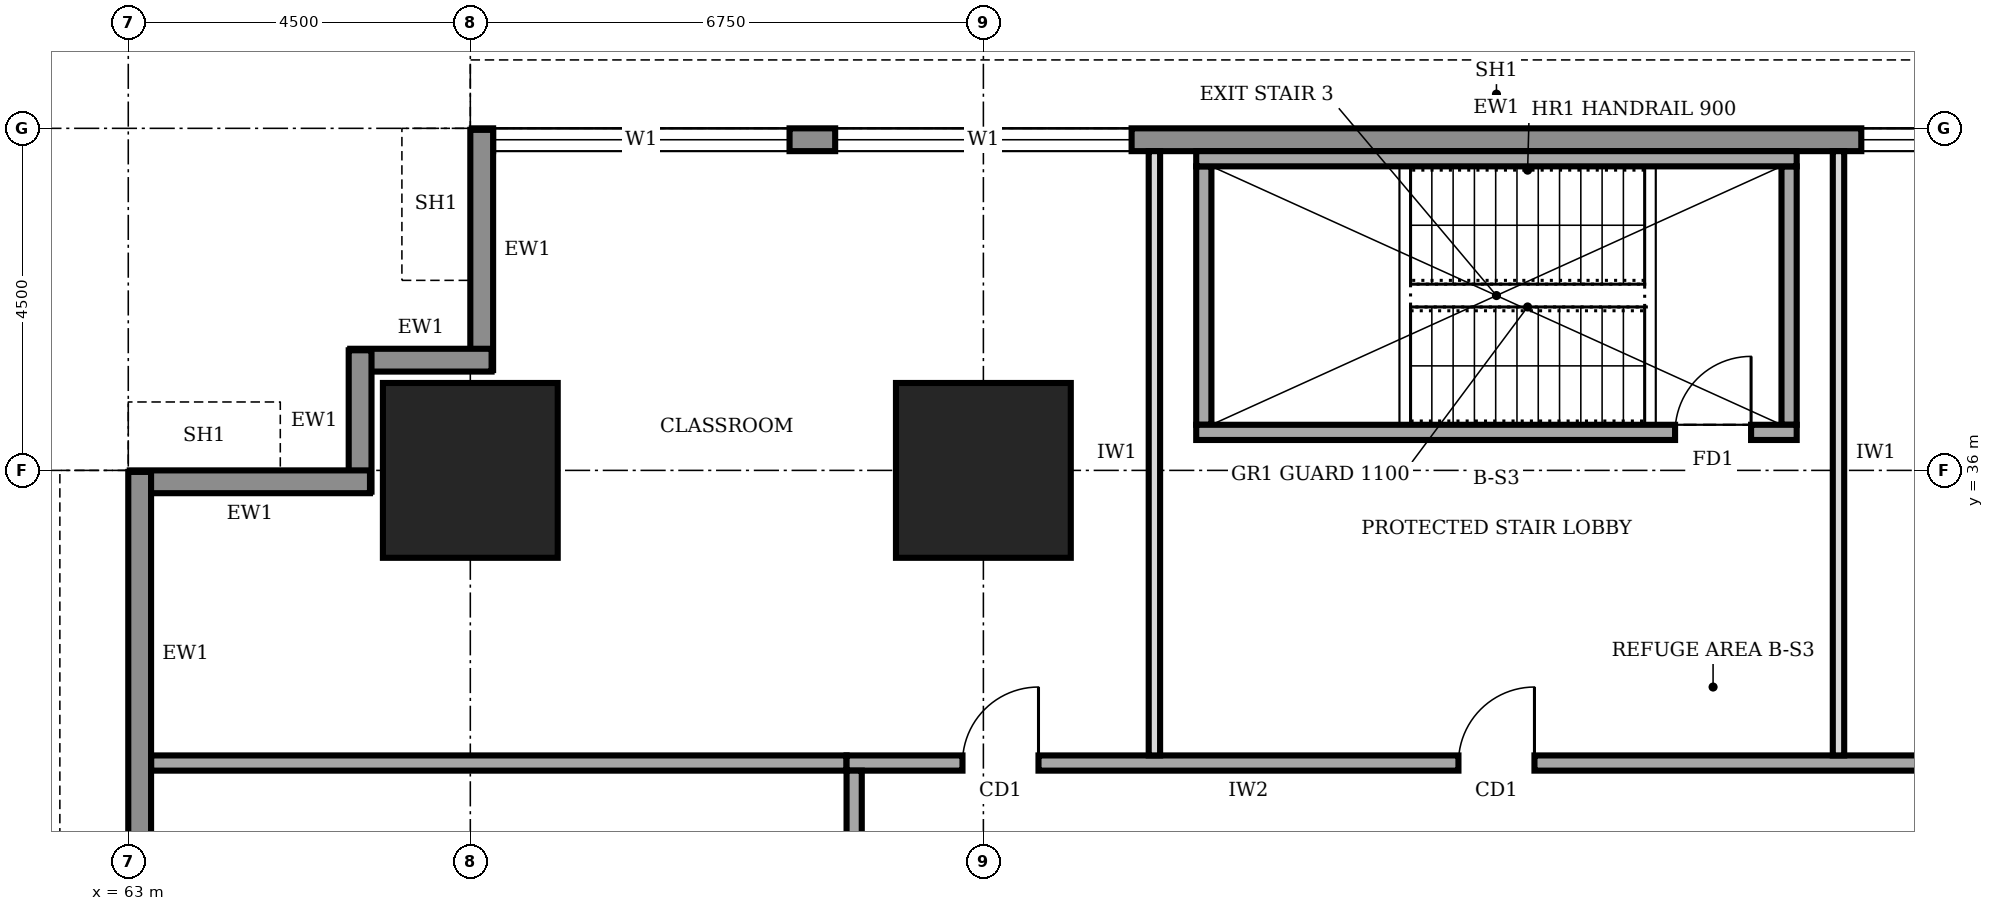
"""IFC4 building model, lengths in metres.
Left out: names, types, materials, properties, quantities, classifications, styles, units other than length and angle.
Written with IfcOpenShell. Run it as: python <this file> out.ifc"""

import sys

from ifc_helpers import new_model, si_unit, direction, frame, frame_2d, origin, origin_2d, place, context, subcontext, project, spatial, rectangle, extrude, element, fill, save


model = new_model("IFC4")
c1 = context("Model", 3, precision=1e-05, world=origin(), true_north=direction((0.0, 1.0)))
c2 = subcontext(c1, "Body", "Model", "MODEL_VIEW")
j1 = project(units=[si_unit("LENGTHUNIT", "METRE"), si_unit("PLANEANGLEUNIT", "RADIAN")], contexts=[c1])
p1 = place(None, origin())
s1 = spatial("IfcSite", under=j1, at=p1, CompositionType="ELEMENT")
p2 = place(p1, origin())
s2 = spatial("IfcBuilding", under=s1, at=p2, CompositionType="ELEMENT")
p3 = place(p2, frame((0.0, 0.0, 41.0)))
s3 = spatial("IfcBuildingStorey", under=s2, at=p3, CompositionType="ELEMENT", Elevation=41.0)
for number, where, z_axis, x_axis in (
    (1, (67.5, 36.0, 0.0), (0.0, 0.0, 1.0), (1.0, 0.0, 0.0)),
    (2, (74.25, 36.0, 0.0), (0.0, 0.0, 1.0), (1.0, 0.0, 0.0)),
):
    element("IfcColumn", number, at=place(p3, frame(where, z_axis=z_axis, x_axis=x_axis)), inside=s3, PredefinedType="COLUMN", context=c2, shape_type="SweptSolid", body=[
        extrude(rectangle(XDim=2.3, YDim=2.3, at=origin_2d()), origin(), (0.0, 0.0, 1.0), 4.0),
    ])
p4 = place(p3, frame((94.48, 40.35, 0.0), z_axis=(0.0, 0.0, 1.0), x_axis=(-1.0, 0.0, 0.0)))
e3 = element("IfcWall", 3, at=p4, inside=s3, PredefinedType="STANDARD", context=c2, shape_type="SweptSolid", body=[
    extrude(rectangle(XDim=26.96, YDim=0.3, at=frame_2d((13.48, 0.0))), origin(), (0.0, 0.0, 1.0), 3.75),
])
p5 = place(p4, frame((22.78, 0.0, 0.9)))
e4 = element("IfcOpeningElement", 4, at=p5, cuts=e3, PredefinedType="OPENING", context=c2, shape_type="SweptSolid", body=[
    extrude(rectangle(XDim=3.9, YDim=2.2, at=frame_2d((1.95, 1.1))), frame((0.0, 0.16, 0.0), z_axis=(0.0, -1.0, 0.0), x_axis=(1.0, 0.0, 0.0)), (0.0, 0.0, 1.0), 0.32),
])
p6 = place(p4, frame((18.28, 0.0, 0.9)))
e5 = element("IfcOpeningElement", 5, at=p6, cuts=e3, PredefinedType="OPENING", context=c2, shape_type="SweptSolid", body=[
    extrude(rectangle(XDim=3.9, YDim=2.2, at=frame_2d((1.95, 1.1))), frame((0.0, 0.16, 0.0), z_axis=(0.0, -1.0, 0.0), x_axis=(1.0, 0.0, 0.0)), (0.0, 0.0, 1.0), 0.32),
])
p7 = place(p4, frame((4.78, 0.0, 0.9)))
e6 = element("IfcOpeningElement", 6, at=p7, cuts=e3, PredefinedType="OPENING", context=c2, shape_type="SweptSolid", body=[
    extrude(rectangle(XDim=3.9, YDim=2.2, at=frame_2d((1.95, 1.1))), frame((0.0, 0.16, 0.0), z_axis=(0.0, -1.0, 0.0), x_axis=(1.0, 0.0, 0.0)), (0.0, 0.0, 1.0), 0.32),
])
p8 = place(p3, frame((67.65, 40.48, 0.0), z_axis=(0.0, 0.0, 1.0), x_axis=(0.0, -1.0, 0.0)))
e7 = element("IfcWall", 7, at=p8, inside=s3, PredefinedType="STANDARD", context=c2, shape_type="SweptSolid", body=[
    extrude(rectangle(XDim=3.16, YDim=0.3, at=frame_2d((1.58, 0.0))), origin(), (0.0, 0.0, 1.0), 2.85),
])
for number, where, z_axis, x_axis in (
    (8, (67.78, 37.45, 0.0), (0.0, 0.0, 1.0), (-1.0, 0.0, 0.0)),
    (9, (66.05, 37.58, 0.0), (0.0, 0.0, 1.0), (0.0, -1.0, 0.0)),
):
    element("IfcWall", number, at=place(p3, frame(where, z_axis=z_axis, x_axis=x_axis)), inside=s3, PredefinedType="STANDARD", context=c2, shape_type="SweptSolid", body=[
        extrude(rectangle(XDim=1.86, YDim=0.3, at=frame_2d((0.93, 0.0))), origin(), (0.0, 0.0, 1.0), 3.75),
    ])
p9 = place(p3, frame((66.18, 35.85, 0.0), z_axis=(0.0, 0.0, 1.0), x_axis=(-1.0, 0.0, 0.0)))
e10 = element("IfcWall", 10, at=p9, inside=s3, PredefinedType="STANDARD", context=c2, shape_type="SweptSolid", body=[
    extrude(rectangle(XDim=3.16, YDim=0.3, at=frame_2d((1.58, 0.0))), origin(), (0.0, 0.0, 1.0), 2.85),
])
p10 = place(p3, frame((63.15, 35.98, 0.0), z_axis=(0.0, 0.0, 1.0), x_axis=(0.0, -1.0, 0.0)))
e11 = element("IfcWall", 11, at=p10, inside=s3, PredefinedType="STANDARD", context=c2, shape_type="SweptSolid", body=[
    extrude(rectangle(XDim=31.46, YDim=0.3, at=frame_2d((15.73, 0.0))), origin(), (0.0, 0.0, 1.0), 3.75),
])
p11 = place(p10, frame((27.28, 0.0, 0.9)))
e12 = element("IfcOpeningElement", 12, at=p11, cuts=e11, PredefinedType="OPENING", context=c2, shape_type="SweptSolid", body=[
    extrude(rectangle(XDim=3.9, YDim=2.2, at=frame_2d((1.95, 1.1))), frame((0.0, 0.16, 0.0), z_axis=(0.0, -1.0, 0.0), x_axis=(1.0, 0.0, 0.0)), (0.0, 0.0, 1.0), 0.32),
])
p12 = place(p10, frame((22.78, 0.0, 0.9)))
e13 = element("IfcOpeningElement", 13, at=p12, cuts=e11, PredefinedType="OPENING", context=c2, shape_type="SweptSolid", body=[
    extrude(rectangle(XDim=3.9, YDim=2.2, at=frame_2d((1.95, 1.1))), frame((0.0, 0.16, 0.0), z_axis=(0.0, -1.0, 0.0), x_axis=(1.0, 0.0, 0.0)), (0.0, 0.0, 1.0), 0.32),
])
p13 = place(p10, frame((18.28, 0.0, 0.9)))
e14 = element("IfcOpeningElement", 14, at=p13, cuts=e11, PredefinedType="OPENING", context=c2, shape_type="SweptSolid", body=[
    extrude(rectangle(XDim=3.9, YDim=2.2, at=frame_2d((1.95, 1.1))), frame((0.0, 0.16, 0.0), z_axis=(0.0, -1.0, 0.0), x_axis=(1.0, 0.0, 0.0)), (0.0, 0.0, 1.0), 0.32),
])
p14 = place(p10, frame((13.78, 0.0, 0.9)))
e15 = element("IfcOpeningElement", 15, at=p14, cuts=e11, PredefinedType="OPENING", context=c2, shape_type="SweptSolid", body=[
    extrude(rectangle(XDim=3.9, YDim=2.2, at=frame_2d((1.95, 1.1))), frame((0.0, 0.16, 0.0), z_axis=(0.0, -1.0, 0.0), x_axis=(1.0, 0.0, 0.0)), (0.0, 0.0, 1.0), 0.32),
])
p15 = place(p10, frame((9.28, 0.0, 0.9)))
e16 = element("IfcOpeningElement", 16, at=p15, cuts=e11, PredefinedType="OPENING", context=c2, shape_type="SweptSolid", body=[
    extrude(rectangle(XDim=3.9, YDim=2.2, at=frame_2d((1.95, 1.1))), frame((0.0, 0.16, 0.0), z_axis=(0.0, -1.0, 0.0), x_axis=(1.0, 0.0, 0.0)), (0.0, 0.0, 1.0), 0.32),
])
p16 = place(p10, frame((4.78, 0.0, 0.9)))
e17 = element("IfcOpeningElement", 17, at=p16, cuts=e11, PredefinedType="OPENING", context=c2, shape_type="SweptSolid", body=[
    extrude(rectangle(XDim=3.9, YDim=2.2, at=frame_2d((1.95, 1.1))), frame((0.0, 0.16, 0.0), z_axis=(0.0, -1.0, 0.0), x_axis=(1.0, 0.0, 0.0)), (0.0, 0.0, 1.0), 0.32),
])
p17 = place(p3, frame((89.35, 32.15, 0.0), z_axis=(0.0, 0.0, 1.0), x_axis=(-1.0, 0.0, 0.0)))
e18 = element("IfcWall", 18, at=p17, inside=s3, PredefinedType="SOLIDWALL", context=c2, shape_type="SweptSolid", body=[
    extrude(rectangle(XDim=16.9, YDim=0.2, at=frame_2d((8.45, 0.0))), origin(), (0.0, 0.0, 1.0), 3.75),
])
p18 = place(p17, frame((14.375, 0.0, 0.0)))
e19 = element("IfcOpeningElement", 19, at=p18, cuts=e18, PredefinedType="OPENING", context=c2, shape_type="SweptSolid", body=[
    extrude(rectangle(XDim=1.0, YDim=2.1, at=frame_2d((0.5, 1.05))), frame((0.0, 0.11, 0.0), z_axis=(0.0, -1.0, 0.0), x_axis=(1.0, 0.0, 0.0)), (0.0, 0.0, 1.0), 0.22),
])
p19 = place(p17, frame((7.85, 0.0, 0.0)))
e20 = element("IfcOpeningElement", 20, at=p19, cuts=e18, PredefinedType="OPENING", context=c2, shape_type="SweptSolid", body=[
    extrude(rectangle(XDim=1.0, YDim=2.1, at=frame_2d((0.5, 1.05))), frame((0.0, 0.11, 0.0), z_axis=(0.0, -1.0, 0.0), x_axis=(1.0, 0.0, 0.0)), (0.0, 0.0, 1.0), 0.22),
])
p20 = place(p17, frame((1.325, 0.0, 0.0)))
e21 = element("IfcOpeningElement", 21, at=p20, cuts=e18, PredefinedType="OPENING", context=c2, shape_type="SweptSolid", body=[
    extrude(rectangle(XDim=1.0, YDim=2.1, at=frame_2d((0.5, 1.05))), frame((0.0, 0.11, 0.0), z_axis=(0.0, -1.0, 0.0), x_axis=(1.0, 0.0, 0.0)), (0.0, 0.0, 1.0), 0.22),
])
p21 = place(p3, frame((72.55, 32.05, 0.0), z_axis=(0.0, 0.0, 1.0), x_axis=(0.0, -1.0, 0.0)))
e22 = element("IfcWall", 22, at=p21, inside=s3, PredefinedType="SOLIDWALL", context=c2, shape_type="SweptSolid", body=[
    extrude(rectangle(XDim=23.8, YDim=0.2, at=frame_2d((11.9, 0.0))), origin(), (0.0, 0.0, 1.0), 3.75),
])
p22 = place(p21, frame((18.425, 0.0, 0.0)))
e23 = element("IfcOpeningElement", 23, at=p22, cuts=e22, PredefinedType="OPENING", context=c2, shape_type="SweptSolid", body=[
    extrude(rectangle(XDim=1.0, YDim=2.1, at=frame_2d((0.5, 1.05))), frame((0.0, 0.11, 0.0), z_axis=(0.0, -1.0, 0.0), x_axis=(1.0, 0.0, 0.0)), (0.0, 0.0, 1.0), 0.22),
])
p23 = place(p21, frame((6.225, 0.0, 0.0)))
e24 = element("IfcOpeningElement", 24, at=p23, cuts=e22, PredefinedType="OPENING", context=c2, shape_type="SweptSolid", body=[
    extrude(rectangle(XDim=1.4, YDim=2.1, at=frame_2d((0.7, 1.05))), frame((0.0, 0.11, 0.0), z_axis=(0.0, -1.0, 0.0), x_axis=(1.0, 0.0, 0.0)), (0.0, 0.0, 1.0), 0.22),
])
p24 = place(p3, frame((63.3, 32.15, 0.0), z_axis=(0.0, 0.0, 1.0), x_axis=(1.0, 0.0, 0.0)))
e25 = element("IfcWall", 25, at=p24, inside=s3, PredefinedType="SOLIDWALL", context=c2, shape_type="SweptSolid", body=[
    extrude(rectangle(XDim=9.15, YDim=0.2, at=frame_2d((4.575, 0.0))), origin(), (0.0, 0.0, 1.0), 3.75),
])
for number, where, z_axis, x_axis in (
    (26, (76.5, 32.25, 0.0), (0.0, 0.0, 1.0), (0.0, 1.0, 0.0)),
    (27, (85.5, 32.25, 0.0), (0.0, 0.0, 1.0), (0.0, 1.0, 0.0)),
):
    element("IfcWall", number, at=place(p3, frame(where, z_axis=z_axis, x_axis=x_axis)), inside=s3, PredefinedType="PARTITIONING", context=c2, shape_type="SweptSolid", body=[
        extrude(rectangle(XDim=7.95, YDim=0.15, at=frame_2d((3.975, 0.0))), origin(), (0.0, 0.0, 1.0), 3.75),
    ])
p25 = place(p3, frame((77.05, 36.5, 0.0), z_axis=(0.0, 0.0, 1.0), x_axis=(1.0, 0.0, 0.0)))
e28 = element("IfcWall", 28, at=p25, inside=s3, PredefinedType="SOLIDWALL", context=c2, shape_type="SweptSolid", body=[
    extrude(rectangle(XDim=7.9, YDim=0.2, at=frame_2d((3.95, 0.0))), origin(), (0.0, 0.0, 1.0), 3.75),
])
p26 = place(p25, frame((6.3, 0.0, 0.0)))
e29 = element("IfcOpeningElement", 29, at=p26, cuts=e28, PredefinedType="OPENING", context=c2, shape_type="SweptSolid", body=[
    extrude(rectangle(XDim=1.0, YDim=2.1, at=frame_2d((0.5, 1.05))), frame((0.0, 0.11, 0.0), z_axis=(0.0, -1.0, 0.0), x_axis=(1.0, 0.0, 0.0)), (0.0, 0.0, 1.0), 0.22),
])
p27 = place(p3, frame((77.05, 40.1, 0.0), z_axis=(0.0, 0.0, 1.0), x_axis=(1.0, 0.0, 0.0)))
e30 = element("IfcWall", 30, at=p27, inside=s3, PredefinedType="SOLIDWALL", context=c2, shape_type="SweptSolid", body=[
    extrude(rectangle(XDim=7.9, YDim=0.2, at=frame_2d((3.95, 0.0))), origin(), (0.0, 0.0, 1.0), 3.75),
])
for number, where, z_axis, x_axis in (
    (31, (77.15, 36.6, 0.0), (0.0, 0.0, 1.0), (0.0, 1.0, 0.0)),
    (32, (84.85, 36.6, 0.0), (0.0, 0.0, 1.0), (0.0, 1.0, 0.0)),
):
    element("IfcWall", number, at=place(p3, frame(where, z_axis=z_axis, x_axis=x_axis)), inside=s3, PredefinedType="SOLIDWALL", context=c2, shape_type="SweptSolid", body=[
        extrude(rectangle(XDim=3.4, YDim=0.2, at=frame_2d((1.7, 0.0))), origin(), (0.0, 0.0, 1.0), 3.75),
    ])
p28 = place(p5, origin())
e33 = element("IfcWindow", 33, at=p28, inside=s3, PartitioningType="SINGLE_PANEL", PredefinedType="WINDOW", context=c2, shape_type="SweptSolid", body=[
    extrude(rectangle(XDim=3.9, YDim=2.2, at=frame_2d((1.95, 1.1))), frame((0.0, 0.03, 0.0), z_axis=(0.0, -1.0, 0.0), x_axis=(1.0, 0.0, 0.0)), (0.0, 0.0, 1.0), 0.06),
])
fill(e4, e33)
p29 = place(p6, origin())
e34 = element("IfcWindow", 34, at=p29, inside=s3, PartitioningType="SINGLE_PANEL", PredefinedType="WINDOW", context=c2, shape_type="SweptSolid", body=[
    extrude(rectangle(XDim=3.9, YDim=2.2, at=frame_2d((1.95, 1.1))), frame((0.0, 0.03, 0.0), z_axis=(0.0, -1.0, 0.0), x_axis=(1.0, 0.0, 0.0)), (0.0, 0.0, 1.0), 0.06),
])
fill(e5, e34)
p30 = place(p7, origin())
e35 = element("IfcWindow", 35, at=p30, inside=s3, PartitioningType="SINGLE_PANEL", PredefinedType="WINDOW", context=c2, shape_type="SweptSolid", body=[
    extrude(rectangle(XDim=3.9, YDim=2.2, at=frame_2d((1.95, 1.1))), frame((0.0, 0.03, 0.0), z_axis=(0.0, -1.0, 0.0), x_axis=(1.0, 0.0, 0.0)), (0.0, 0.0, 1.0), 0.06),
])
fill(e6, e35)
p31 = place(p18, frame((1.0, 0.0, 0.0), z_axis=(0.0, 0.0, 1.0), x_axis=(-1.0, 0.0, 0.0)))
e36 = element("IfcDoor", 36, at=p31, inside=s3, OperationType="SINGLE_SWING_RIGHT", PredefinedType="DOOR", context=c2, shape_type="SweptSolid", body=[
    extrude(rectangle(XDim=1.0, YDim=2.1, at=frame_2d((0.5, 1.05))), frame((0.0, 0.025, 0.0), z_axis=(0.0, -1.0, 0.0), x_axis=(1.0, 0.0, 0.0)), (0.0, 0.0, 1.0), 0.05),
])
fill(e19, e36)
p32 = place(p19, frame((1.0, 0.0, 0.0), z_axis=(0.0, 0.0, 1.0), x_axis=(-1.0, 0.0, 0.0)))
e37 = element("IfcDoor", 37, at=p32, inside=s3, OperationType="SINGLE_SWING_RIGHT", PredefinedType="DOOR", context=c2, shape_type="SweptSolid", body=[
    extrude(rectangle(XDim=1.0, YDim=2.1, at=frame_2d((0.5, 1.05))), frame((0.0, 0.025, 0.0), z_axis=(0.0, -1.0, 0.0), x_axis=(1.0, 0.0, 0.0)), (0.0, 0.0, 1.0), 0.05),
])
fill(e20, e37)
p33 = place(p26, origin())
e38 = element("IfcDoor", 38, at=p33, inside=s3, OperationType="SINGLE_SWING_RIGHT", PredefinedType="DOOR", context=c2, shape_type="SweptSolid", body=[
    extrude(rectangle(XDim=1.0, YDim=2.1, at=frame_2d((0.5, 1.05))), frame((0.0, 0.025, 0.0), z_axis=(0.0, -1.0, 0.0), x_axis=(1.0, 0.0, 0.0)), (0.0, 0.0, 1.0), 0.05),
])
fill(e29, e38)
save(model, sys.argv[1])
